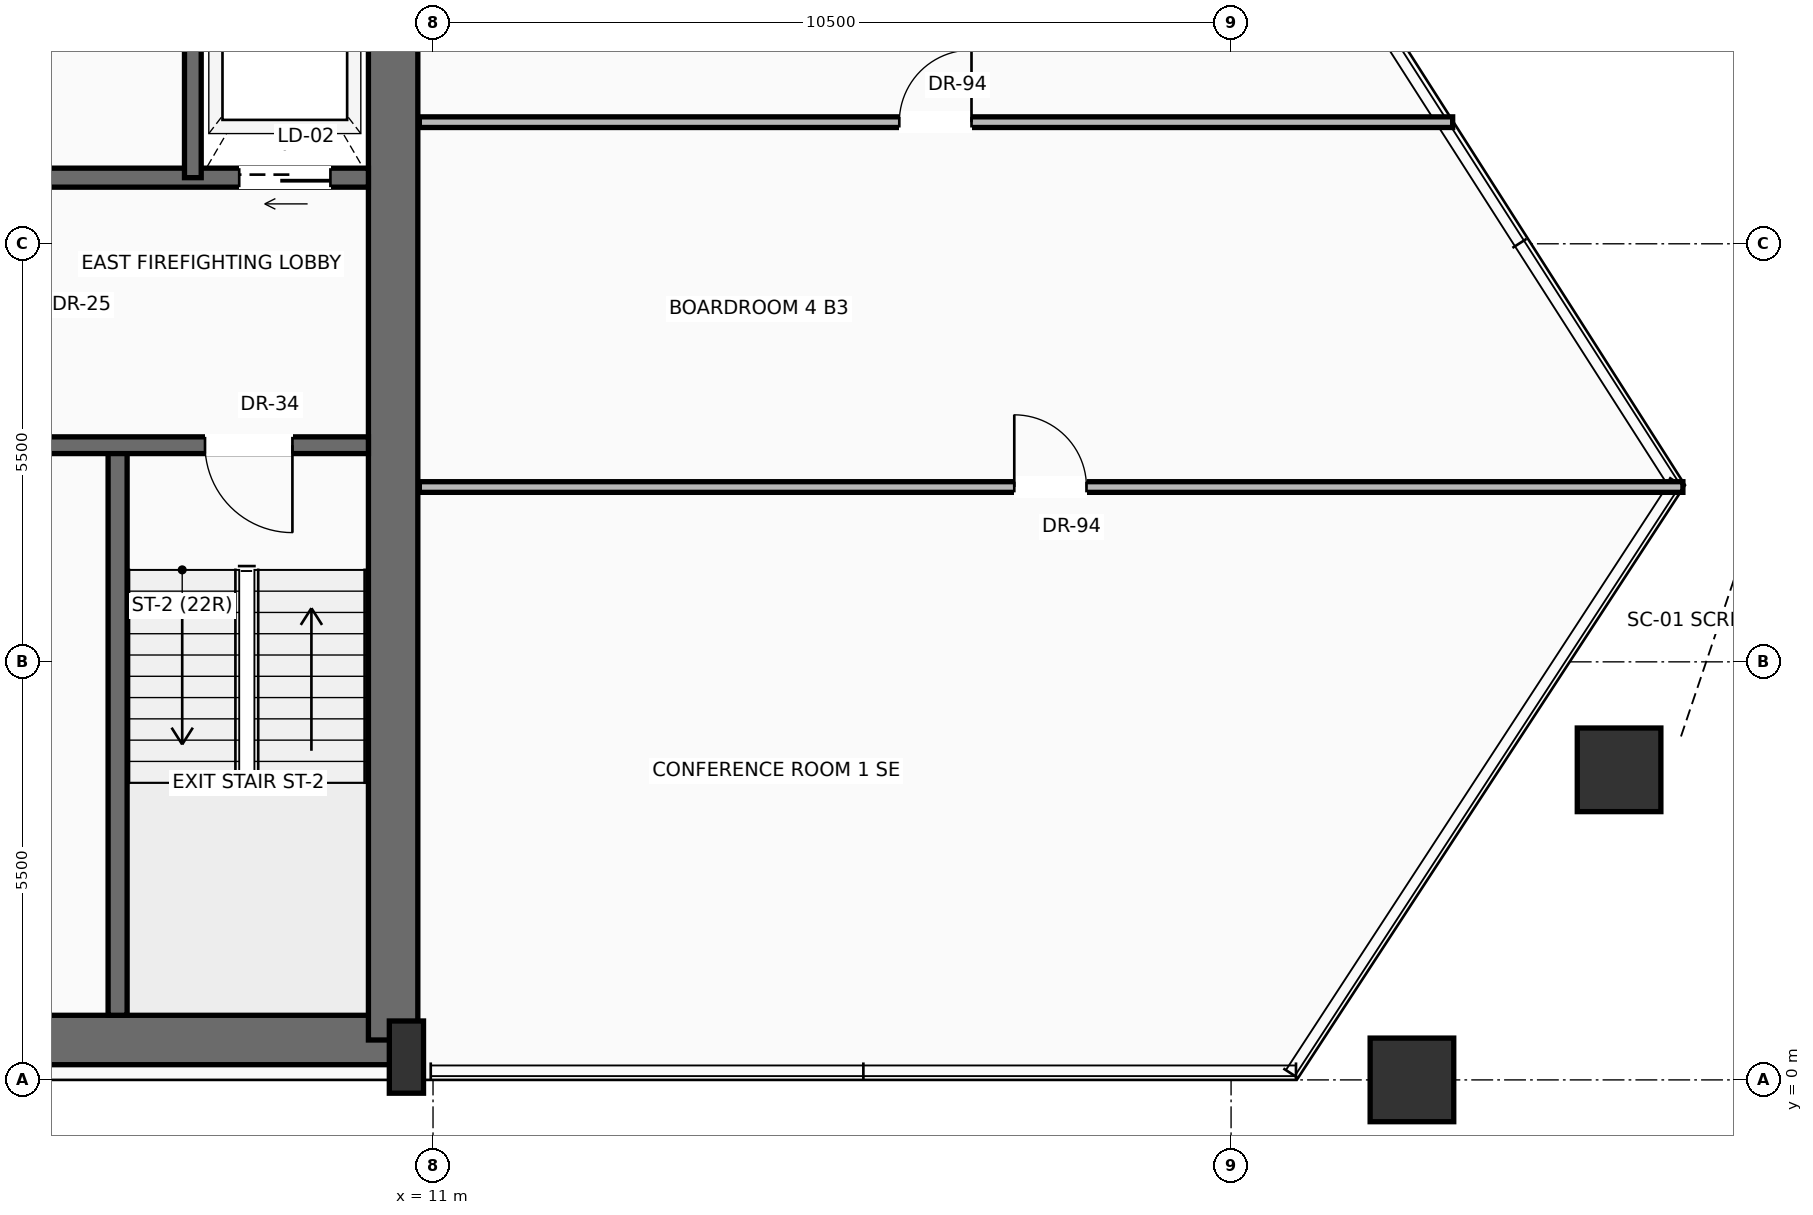
"""IFC4 building model, lengths in metres.
Left out: names, types, materials, properties, quantities, classifications, styles, units other than length and angle.
Written with IfcOpenShell. Run it as: python <this file> out.ifc"""

import sys

from ifc_helpers import new_model, si_unit, direction, frame, frame_2d, origin, origin_2d, place, context, subcontext, project, spatial, rectangle, hollow_rectangle, extrude, source, transform, mapped, element, fill, save


model = new_model("IFC4")
c1 = context("Model", 3, precision=1e-05, world=origin(), true_north=direction((0.0, 1.0)))
c2 = subcontext(c1, "Body", "Model", "MODEL_VIEW")
j1 = project(units=[si_unit("LENGTHUNIT", "METRE"), si_unit("PLANEANGLEUNIT", "RADIAN")], contexts=[c1])
p1 = place(None, origin())
s1 = spatial("IfcSite", under=j1, at=p1, CompositionType="ELEMENT")
p2 = place(p1, origin())
s2 = spatial("IfcBuilding", under=s1, at=p2, CompositionType="ELEMENT")
p3 = place(p2, frame((0.0, 0.0, 136.7)))
s3 = spatial("IfcBuildingStorey", under=s2, at=p3, CompositionType="ELEMENT", Elevation=136.7)
p4 = place(p3, frame((-10.65, 0.525, 0.0), z_axis=(0.0, 0.0, 1.0), x_axis=(1.0, 0.0, 0.0)))
e1 = element("IfcWall", 1, at=p4, inside=s3, PredefinedType="SHEAR", context=c2, shape_type="SweptSolid", body=[
    extrude(rectangle(XDim=21.3, YDim=0.65, at=frame_2d((10.65, 0.0))), origin(), (0.0, 0.0, 1.0), 3.47),
])
p5 = place(p3, frame((10.475, 0.525, 0.0), z_axis=(0.0, 0.0, 1.0), x_axis=(0.0, 1.0, 0.0)))
e2 = element("IfcWall", 2, at=p5, inside=s3, PredefinedType="SHEAR", context=c2, shape_type="SweptSolid", body=[
    extrude(rectangle(XDim=15.55, YDim=0.65, at=frame_2d((7.775, 0.0))), origin(), (0.0, 0.0, 1.0), 3.47),
])
m1 = source(origin(), c2, "Body", "SweptSolid", [
    extrude(rectangle(XDim=0.45, YDim=0.95, at=origin_2d()), origin(), (0.0, 0.0, 1.0), 3.7),
])
p6 = place(p3, frame((10.65, 0.3, 0.0), z_axis=(0.0, 0.0, 1.0), x_axis=(1.0, 0.0, 0.0)))
e3 = element("IfcColumn", 3, at=p6, inside=s3, PredefinedType="PILASTER", context=c2, shape_type="MappedRepresentation", body=[
    mapped(m1, transform((0.0, 0.0, 0.0), scale=1.0)),
])
m2 = source(origin(), c2, "Body", "SweptSolid", [
    extrude(hollow_rectangle(XDim=1.1, YDim=1.1, WallThickness=0.055, at=origin_2d()), origin(), (0.0, 0.0, 1.0), 3.691),
])
p7 = place(p3, frame((23.88, 0.0, 0.004), z_axis=(0.008994940015, 0.0, 0.999959544709), x_axis=(0.0, 1.0, 0.0)))
e4 = element("IfcColumn", 4, at=p7, inside=s3, PredefinedType="COLUMN", context=c2, shape_type="MappedRepresentation", body=[
    mapped(m2, transform((0.0, 0.0, 0.0), scale=1.0)),
])
m3 = source(origin(), c2, "Body", "SweptSolid", [
    extrude(hollow_rectangle(XDim=1.1, YDim=1.1, WallThickness=0.055, at=origin_2d()), origin(), (0.0, 0.0, 1.0), 3.692),
])
p8 = place(p3, frame((26.605, 4.079, 0.004), z_axis=(-0.003571221589, -0.015343026087, 0.999875911264), x_axis=(0.973964929642, -0.226698733624, 0.0)))
e5 = element("IfcColumn", 5, at=p8, inside=s3, PredefinedType="COLUMN", context=c2, shape_type="MappedRepresentation", body=[
    mapped(m3, transform((0.0, 0.0, 0.0), scale=1.0)),
])
p9 = place(p3, frame((6.85, 0.85, 0.0), z_axis=(0.0, 0.0, 1.0), x_axis=(0.0, 1.0, 0.0)))
e6 = element("IfcWall", 6, at=p9, inside=s3, PredefinedType="SOLIDWALL", context=c2, shape_type="SweptSolid", body=[
    extrude(rectangle(XDim=7.5, YDim=0.25, at=frame_2d((3.75, 0.0))), origin(), (0.0, 0.0, 1.0), 3.47),
])
p10 = place(p3, frame((10.15, 8.35, 0.0), z_axis=(0.0, 0.0, 1.0), x_axis=(-1.0, 0.0, 0.0)))
e7 = element("IfcWall", 7, at=p10, inside=s3, PredefinedType="SOLIDWALL", context=c2, shape_type="SweptSolid", body=[
    extrude(rectangle(XDim=4.65, YDim=0.22, at=frame_2d((2.325, 0.0))), origin(), (0.0, 0.0, 1.0), 3.47),
])
p11 = place(p10, frame((1.0, 0.0, 0.0)))
e8 = element("IfcOpeningElement", 8, at=p11, cuts=e7, PredefinedType="OPENING", context=c2, shape_type="SweptSolid", body=[
    extrude(rectangle(XDim=1.15, YDim=2.2, at=frame_2d((0.575, 1.1))), frame((0.0, 0.12, 0.0), z_axis=(0.0, -1.0, 0.0), x_axis=(1.0, 0.0, 0.0)), (0.0, 0.0, 1.0), 0.24),
])
p12 = place(p3, frame((10.15, 11.87, 0.0), z_axis=(0.0, 0.0, 1.0), x_axis=(-1.0, 0.0, 0.0)))
e9 = element("IfcWall", 9, at=p12, inside=s3, PredefinedType="SOLIDWALL", context=c2, shape_type="SweptSolid", body=[
    extrude(rectangle(XDim=4.65, YDim=0.25, at=frame_2d((2.325, 0.0))), origin(), (0.0, 0.0, 1.0), 3.47),
])
p13 = place(p12, frame((0.5, 0.0, 0.0)))
e10 = element("IfcOpeningElement", 10, at=p13, cuts=e9, PredefinedType="OPENING", context=c2, shape_type="SweptSolid", body=[
    extrude(rectangle(XDim=1.2, YDim=2.25, at=frame_2d((0.6, 1.125))), frame((0.0, 0.135, 0.0), z_axis=(0.0, -1.0, 0.0), x_axis=(1.0, 0.0, 0.0)), (0.0, 0.0, 1.0), 0.27),
])
p14 = place(p3, frame((7.84, 11.87, 0.0), z_axis=(0.0, 0.0, 1.0), x_axis=(0.0, 1.0, 0.0)))
e11 = element("IfcWall", 11, at=p14, inside=s3, PredefinedType="SOLIDWALL", context=c2, shape_type="SweptSolid", body=[
    extrude(rectangle(XDim=3.88, YDim=0.22, at=frame_2d((1.94, 0.0))), origin(), (0.0, 0.0, 1.0), 3.47),
])
p15 = place(p3, frame((10.82, 7.8, 0.0), z_axis=(0.0, 0.0, 1.0), x_axis=(1.0, 0.0, 0.0)))
e12 = element("IfcWall", 12, at=p15, inside=s3, PredefinedType="PARTITIONING", context=c2, shape_type="SweptSolid", body=[
    extrude(rectangle(XDim=16.625, YDim=0.14, at=frame_2d((8.312, 0.0))), origin(), (0.0, 0.0, 1.0), 3.462),
])
p16 = place(p15, frame((7.828, 0.0, 0.0)))
e13 = element("IfcOpeningElement", 13, at=p16, cuts=e12, PredefinedType="OPENING", context=c2, shape_type="SweptSolid", body=[
    extrude(rectangle(XDim=0.95, YDim=2.2, at=frame_2d((0.475, 1.1))), frame((0.0, 0.08, 0.0), z_axis=(0.0, -1.0, 0.0), x_axis=(1.0, 0.0, 0.0)), (0.0, 0.0, 1.0), 0.16),
])
p17 = place(p3, frame((10.82, 12.6, 0.0), z_axis=(0.0, 0.0, 1.0), x_axis=(1.0, 0.0, 0.0)))
e14 = element("IfcWall", 14, at=p17, inside=s3, PredefinedType="PARTITIONING", context=c2, shape_type="SweptSolid", body=[
    extrude(rectangle(XDim=13.595, YDim=0.14, at=frame_2d((6.798, 0.0))), origin(), (0.0, 0.0, 1.0), 3.462),
])
p18 = place(p17, frame((6.315, 0.0, 0.0)))
e15 = element("IfcOpeningElement", 15, at=p18, cuts=e14, PredefinedType="OPENING", context=c2, shape_type="SweptSolid", body=[
    extrude(rectangle(XDim=0.95, YDim=2.2, at=frame_2d((0.475, 1.1))), frame((0.0, 0.08, 0.0), z_axis=(0.0, -1.0, 0.0), x_axis=(1.0, 0.0, 0.0)), (0.0, 0.0, 1.0), 0.16),
])
m4 = source(origin(), c2, "Body", "SweptSolid", [
    extrude(rectangle(XDim=1.15, YDim=2.2, at=frame_2d((0.575, 1.1))), frame((0.0, 0.025, 0.0), z_axis=(0.0, -1.0, 0.0), x_axis=(1.0, 0.0, 0.0)), (0.0, 0.0, 1.0), 0.05),
])
p19 = place(p11, origin())
e16 = element("IfcDoor", 16, at=p19, inside=s3, OperationType="SINGLE_SWING_LEFT", PredefinedType="DOOR", context=c2, shape_type="MappedRepresentation", body=[
    mapped(m4, transform((0.0, 0.0, 0.0), scale=1.0)),
])
fill(e8, e16)
m5 = source(origin(), c2, "Body", "SweptSolid", [
    extrude(rectangle(XDim=1.2, YDim=2.25, at=frame_2d((0.6, 1.125))), frame((0.0, 0.025, 0.0), z_axis=(0.0, -1.0, 0.0), x_axis=(1.0, 0.0, 0.0)), (0.0, 0.0, 1.0), 0.05),
])
p20 = place(p13, origin())
e17 = element("IfcDoor", 17, at=p20, inside=s3, OperationType="SLIDING_TO_RIGHT", PredefinedType="DOOR", context=c2, shape_type="MappedRepresentation", body=[
    mapped(m5, transform((0.0, 0.0, 0.0), scale=1.0)),
])
fill(e10, e17)
m6 = source(origin(), c2, "Body", "SweptSolid", [
    extrude(rectangle(XDim=0.95, YDim=2.2, at=frame_2d((0.475, 1.1))), frame((0.0, 0.025, 0.0), z_axis=(0.0, -1.0, 0.0), x_axis=(1.0, 0.0, 0.0)), (0.0, 0.0, 1.0), 0.05),
])
p21 = place(p18, origin())
e18 = element("IfcDoor", 18, at=p21, inside=s3, OperationType="SINGLE_SWING_RIGHT", PredefinedType="DOOR", context=c2, shape_type="MappedRepresentation", body=[
    mapped(m6, transform((0.0, 0.0, 0.0), scale=1.0)),
])
fill(e15, e18)
p22 = place(p16, origin())
e19 = element("IfcDoor", 19, at=p22, inside=s3, OperationType="SINGLE_SWING_LEFT", PredefinedType="DOOR", context=c2, shape_type="MappedRepresentation", body=[
    mapped(m6, transform((0.0, 0.0, 0.0), scale=1.0)),
])
fill(e13, e19)
save(model, sys.argv[1])
